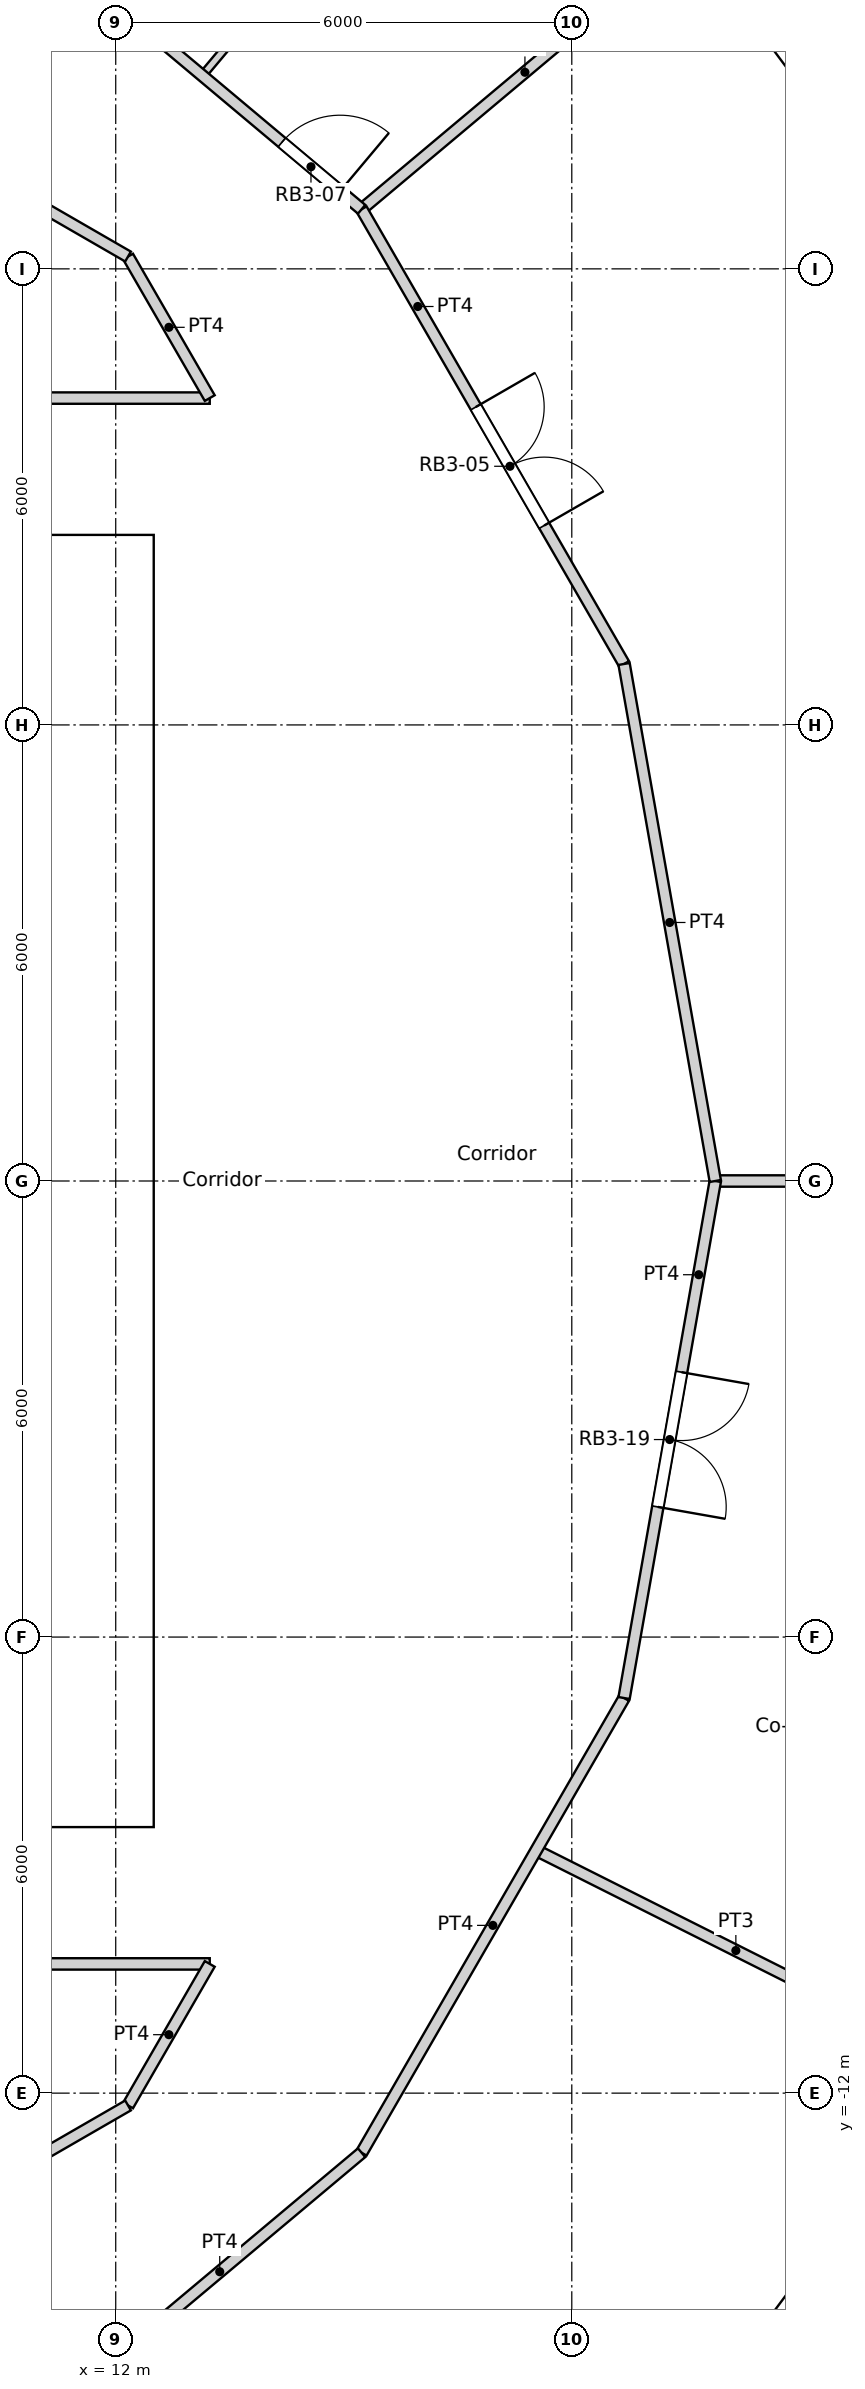
"""IFC4 building model, lengths in metres.
Left out: names, types, materials, properties, quantities, classifications, styles, units other than length and angle.
Written with IfcOpenShell. Run it as: python <this file> out.ifc"""

import sys

from ifc_helpers import new_model, si_unit, direction, frame, frame_2d, origin, origin_2d, place, context, subcontext, project, spatial, rectangle, circle, extrude, element, fill, save


model = new_model("IFC4")
c1 = context("Model", 3, precision=1e-05, world=origin(), true_north=direction((0.0, 1.0)))
c2 = subcontext(c1, "Body", "Model", "MODEL_VIEW")
j1 = project(units=[si_unit("LENGTHUNIT", "METRE"), si_unit("PLANEANGLEUNIT", "RADIAN")], contexts=[c1])
p1 = place(None, origin())
s1 = spatial("IfcSite", under=j1, at=p1, CompositionType="ELEMENT")
p2 = place(p1, origin())
s2 = spatial("IfcBuilding", under=s1, at=p2, CompositionType="ELEMENT")
p3 = place(p2, frame((0.0, 0.0, 147.6)))
s3 = spatial("IfcBuildingStorey", under=s2, at=p3, CompositionType="ELEMENT", Elevation=147.6)
for number, where, z_axis, x_axis in (
    (1, (18.822, 0.0, 0.0), (0.0, 0.0, 1.0), (1.0, 0.0, 0.0)),
    (2, (17.986, 5.548, 0.0), (0.0, 0.0, 1.0), (1.0, 0.0, 0.0)),
    (3, (15.552, 10.603, 0.0), (0.0, 0.0, 1.0), (1.0, 0.0, 0.0)),
    (4, (11.735, 14.716, 0.0), (0.0, 0.0, 1.0), (1.0, 0.0, 0.0)),
    (5, (11.735, -14.716, 0.0), (0.0, 0.0, 1.0), (1.0, 0.0, 0.0)),
    (6, (15.552, -10.603, 0.0), (0.0, 0.0, 1.0), (1.0, 0.0, 0.0)),
    (7, (17.986, -5.548, 0.0), (0.0, 0.0, 1.0), (1.0, 0.0, 0.0)),
):
    element("IfcColumn", number, at=place(p3, frame(where, z_axis=z_axis, x_axis=x_axis)), inside=s3, PredefinedType="COLUMN", context=c2, shape_type="SweptSolid", body=[
        extrude(circle(Radius=0.65, at=origin_2d()), origin(), (0.0, 0.0, 1.0), 3.6),
    ])
p4 = place(p3, frame((21.428, 14.094, 0.0), z_axis=(0.0, 0.0, 1.0), x_axis=(-0.597197580538, 0.80209416517, 0.0)))
e8 = element("IfcWall", 8, at=p4, inside=s3, PredefinedType="SOLIDWALL", context=c2, shape_type="SweptSolid", body=[
    extrude(rectangle(XDim=2.973, YDim=0.3, at=frame_2d((1.486, 0.0))), origin(), (0.0, 0.0, 1.0), 3.3),
])
p5 = place(p4, frame((1.486, 0.0, 1.55)))
e9 = element("IfcOpeningElement", 9, at=p5, cuts=e8, PredefinedType="OPENING", context=c2, shape_type="SweptSolid", body=[
    extrude(circle(Radius=0.9, at=origin_2d()), frame((0.0, 0.16, 0.0), z_axis=(0.0, -1.0, 0.0), x_axis=(1.0, 0.0, 0.0)), (0.0, 0.0, 1.0), 0.32),
])
p6 = place(p3, frame((20.103, -16.836, -0.3), z_axis=(0.0, 0.0, 1.0), x_axis=(0.597183717734, 0.802104486506, 0.0)))
e10 = element("IfcWall", 10, at=p6, inside=s3, PredefinedType="ELEMENTEDWALL", context=c2, shape_type="SweptSolid", body=[
    extrude(rectangle(XDim=3.0, YDim=1.45, at=frame_2d((1.5, 0.0))), origin(), (0.0, 0.0, 1.0), 3.6),
])
p7 = place(p6, frame((1.5, 0.0, 1.85)))
e11 = element("IfcOpeningElement", 11, at=p7, cuts=e10, PredefinedType="OPENING", context=c2, shape_type="SweptSolid", body=[
    extrude(circle(Radius=0.9, at=origin_2d()), frame((0.0, 0.735, 0.0), z_axis=(0.0, -1.0, 0.0), x_axis=(1.0, 0.0, 0.0)), (0.0, 0.0, 1.0), 1.47),
])
p8 = place(p3, frame((-12.5, -8.05, 0.0), z_axis=(0.0, 0.0, 1.0), x_axis=(1.0, 0.0, 0.0)))
e12 = element("IfcWall", 12, at=p8, inside=s3, PredefinedType="SOLIDWALL", context=c2, shape_type="SweptSolid", body=[
    extrude(rectangle(XDim=25.0, YDim=0.9, at=frame_2d((12.5, 0.0))), origin(), (0.0, 0.0, 1.0), 3.6),
])
p9 = place(p8, frame((13.4, 0.0, 0.0)))
e13 = element("IfcOpeningElement", 13, at=p9, cuts=e12, PredefinedType="OPENING", context=c2, shape_type="SweptSolid", body=[
    extrude(rectangle(XDim=1.0, YDim=2.1, at=frame_2d((0.5, 1.05))), frame((0.0, 0.45, 0.0), z_axis=(0.0, -1.0, 0.0), x_axis=(1.0, 0.0, 0.0)), (0.0, 0.0, 1.0), 0.9),
])
p10 = place(p8, frame((8.3, 0.0, 0.0)))
e14 = element("IfcOpeningElement", 14, at=p10, cuts=e12, PredefinedType="OPENING", context=c2, shape_type="SweptSolid", body=[
    extrude(rectangle(XDim=1.8, YDim=2.1, at=frame_2d((0.9, 1.05))), frame((0.0, 0.45, 0.0), z_axis=(0.0, -1.0, 0.0), x_axis=(1.0, 0.0, 0.0)), (0.0, 0.0, 1.0), 0.9),
])
p11 = place(p8, frame((14.9, 0.0, 0.0)))
e15 = element("IfcOpeningElement", 15, at=p11, cuts=e12, PredefinedType="OPENING", context=c2, shape_type="SweptSolid", body=[
    extrude(rectangle(XDim=1.8, YDim=2.1, at=frame_2d((0.9, 1.05))), frame((0.0, 0.45, 0.0), z_axis=(0.0, -1.0, 0.0), x_axis=(1.0, 0.0, 0.0)), (0.0, 0.0, 1.0), 0.9),
])
p12 = place(p3, frame((-12.5, 8.05, 0.0), z_axis=(0.0, 0.0, 1.0), x_axis=(1.0, 0.0, 0.0)))
e16 = element("IfcWall", 16, at=p12, inside=s3, PredefinedType="SOLIDWALL", context=c2, shape_type="SweptSolid", body=[
    extrude(rectangle(XDim=25.0, YDim=0.9, at=frame_2d((12.5, 0.0))), origin(), (0.0, 0.0, 1.0), 3.6),
])
p13 = place(p12, frame((8.3, 0.0, 0.0)))
e17 = element("IfcOpeningElement", 17, at=p13, cuts=e16, PredefinedType="OPENING", context=c2, shape_type="SweptSolid", body=[
    extrude(rectangle(XDim=1.8, YDim=2.1, at=frame_2d((0.9, 1.05))), frame((0.0, 0.45, 0.0), z_axis=(0.0, -1.0, 0.0), x_axis=(1.0, 0.0, 0.0)), (0.0, 0.0, 1.0), 0.9),
])
p14 = place(p3, frame((12.05, -7.6, 0.0), z_axis=(0.0, 0.0, 1.0), x_axis=(0.0, 1.0, 0.0)))
e18 = element("IfcWall", 18, at=p14, inside=s3, PredefinedType="SOLIDWALL", context=c2, shape_type="SweptSolid", body=[
    extrude(rectangle(XDim=15.2, YDim=0.9, at=frame_2d((7.6, 0.0))), origin(), (0.0, 0.0, 1.0), 3.6),
])
p15 = place(p14, frame((5.1, 0.0, 0.0)))
e19 = element("IfcOpeningElement", 19, at=p15, cuts=e18, PredefinedType="OPENING", context=c2, shape_type="SweptSolid", body=[
    extrude(rectangle(XDim=1.0, YDim=2.1, at=frame_2d((0.5, 1.05))), frame((0.0, 0.45, 0.0), z_axis=(0.0, -1.0, 0.0), x_axis=(1.0, 0.0, 0.0)), (0.0, 0.0, 1.0), 0.9),
])
p16 = place(p3, frame((9.2, -4.55, 0.0), z_axis=(0.0, 0.0, 1.0), x_axis=(1.0, 0.0, 0.0)))
e20 = element("IfcWall", 20, at=p16, inside=s3, PredefinedType="SOLIDWALL", context=c2, shape_type="SweptSolid", body=[
    extrude(rectangle(XDim=2.4, YDim=0.3, at=frame_2d((1.2, 0.0))), origin(), (0.0, 0.0, 1.0), 3.3),
])
p17 = place(p16, frame((0.65, 0.0, 0.0)))
e21 = element("IfcOpeningElement", 21, at=p17, cuts=e20, PredefinedType="OPENING", context=c2, shape_type="SweptSolid", body=[
    extrude(rectangle(XDim=1.1, YDim=2.1, at=frame_2d((0.55, 1.05))), frame((0.0, 0.15, 0.0), z_axis=(0.0, -1.0, 0.0), x_axis=(1.0, 0.0, 0.0)), (0.0, 0.0, 1.0), 0.3),
])
p18 = place(p3, frame((9.2, 4.55, 0.0), z_axis=(0.0, 0.0, 1.0), x_axis=(1.0, 0.0, 0.0)))
e22 = element("IfcWall", 22, at=p18, inside=s3, PredefinedType="SOLIDWALL", context=c2, shape_type="SweptSolid", body=[
    extrude(rectangle(XDim=2.4, YDim=0.3, at=frame_2d((1.2, 0.0))), origin(), (0.0, 0.0, 1.0), 3.3),
])
p19 = place(p18, frame((0.65, 0.0, 0.0)))
e23 = element("IfcOpeningElement", 23, at=p19, cuts=e22, PredefinedType="OPENING", context=c2, shape_type="SweptSolid", body=[
    extrude(rectangle(XDim=1.1, YDim=2.1, at=frame_2d((0.55, 1.05))), frame((0.0, 0.15, 0.0), z_axis=(0.0, -1.0, 0.0), x_axis=(1.0, 0.0, 0.0)), (0.0, 0.0, 1.0), 0.3),
])
p20 = place(p3, frame((-3.025, 10.3, 0.0), z_axis=(0.0, 0.0, 1.0), x_axis=(1.0, 0.0, 0.0)))
e24 = element("IfcWall", 24, at=p20, inside=s3, PredefinedType="PARTITIONING", context=c2, shape_type="SweptSolid", body=[
    extrude(rectangle(XDim=16.262, YDim=0.15, at=frame_2d((8.131, 0.0))), origin(), (0.0, 0.0, 1.0), 3.3),
])
p21 = place(p20, frame((7.288, 0.0, 0.0)))
e25 = element("IfcOpeningElement", 25, at=p21, cuts=e24, PredefinedType="OPENING", context=c2, shape_type="SweptSolid", body=[
    extrude(rectangle(XDim=0.95, YDim=2.1, at=frame_2d((0.475, 1.05))), frame((0.0, 0.075, 0.0), z_axis=(0.0, -1.0, 0.0), x_axis=(1.0, 0.0, 0.0)), (0.0, 0.0, 1.0), 0.15),
])
p22 = place(p3, frame((-3.025, -10.3, 0.0), z_axis=(0.0, 0.0, 1.0), x_axis=(1.0, 0.0, 0.0)))
e26 = element("IfcWall", 26, at=p22, inside=s3, PredefinedType="PARTITIONING", context=c2, shape_type="SweptSolid", body=[
    extrude(rectangle(XDim=16.262, YDim=0.15, at=frame_2d((8.131, 0.0))), origin(), (0.0, 0.0, 1.0), 3.3),
])
p23 = place(p22, frame((7.287, 0.0, 0.0)))
e27 = element("IfcOpeningElement", 27, at=p23, cuts=e26, PredefinedType="OPENING", context=c2, shape_type="SweptSolid", body=[
    extrude(rectangle(XDim=0.95, YDim=2.1, at=frame_2d((0.475, 1.05))), frame((0.0, 0.075, 0.0), z_axis=(0.0, -1.0, 0.0), x_axis=(1.0, 0.0, 0.0)), (0.0, 0.0, 1.0), 0.15),
])
for number, where, z_axis, x_axis in (
    (28, (12.162, 12.162, 0.0), (0.0, 0.0, 1.0), (0.5, -0.866, 0.0)),
    (29, (12.162, -12.162, 0.0), (0.0, 0.0, 1.0), (0.5, 0.866, 0.0)),
):
    element("IfcWall", number, at=place(p3, frame(where, z_axis=z_axis, x_axis=x_axis)), inside=s3, PredefinedType="PARTITIONING", context=c2, shape_type="SweptSolid", body=[
        extrude(rectangle(XDim=2.15, YDim=0.15, at=frame_2d((1.075, 0.0))), origin(), (0.0, 0.0, 1.0), 3.3),
    ])
p24 = place(p3, frame((15.235, 12.784, 0.0), z_axis=(0.0, 0.0, 1.0), x_axis=(0.499914202267, -0.866074933462, 0.0)))
e30 = element("IfcWall", 30, at=p24, inside=s3, PredefinedType="PARTITIONING", context=c2, shape_type="SweptSolid", body=[
    extrude(rectangle(XDim=6.907, YDim=0.15, at=frame_2d((3.454, 0.0))), origin(), (0.0, 0.0, 1.0), 3.3),
])
p25 = place(p24, frame((3.004, 0.0, 0.0)))
e31 = element("IfcOpeningElement", 31, at=p25, cuts=e30, PredefinedType="OPENING", context=c2, shape_type="SweptSolid", body=[
    extrude(rectangle(XDim=1.8, YDim=2.1, at=frame_2d((0.9, 1.05))), frame((0.0, 0.075, 0.0), z_axis=(0.0, -1.0, 0.0), x_axis=(1.0, 0.0, 0.0)), (0.0, 0.0, 1.0), 0.15),
])
p26 = place(p3, frame((18.688, 6.802, 0.0), z_axis=(0.0, 0.0, 1.0), x_axis=(0.173728873845, -0.98479352069, 0.0)))
e32 = element("IfcWall", 32, at=p26, inside=s3, PredefinedType="PARTITIONING", context=c2, shape_type="SweptSolid", body=[
    extrude(rectangle(XDim=6.907, YDim=0.15, at=frame_2d((3.454, 0.0))), origin(), (0.0, 0.0, 1.0), 3.3),
])
p27 = place(p3, frame((9.943, 17.222, 0.0), z_axis=(0.0, 0.0, 1.0), x_axis=(0.766192104565, -0.642611592567, 0.0)))
e33 = element("IfcWall", 33, at=p27, inside=s3, PredefinedType="PARTITIONING", context=c2, shape_type="SweptSolid", body=[
    extrude(rectangle(XDim=6.906, YDim=0.15, at=frame_2d((3.453, 0.0))), origin(), (0.0, 0.0, 1.0), 3.3),
])
p28 = place(p27, frame((5.537, 0.0, 0.0)))
e34 = element("IfcOpeningElement", 34, at=p28, cuts=e33, PredefinedType="OPENING", context=c2, shape_type="SweptSolid", body=[
    extrude(rectangle(XDim=1.0, YDim=2.1, at=frame_2d((0.5, 1.05))), frame((0.0, 0.075, 0.0), z_axis=(0.0, -1.0, 0.0), x_axis=(1.0, 0.0, 0.0)), (0.0, 0.0, 1.0), 0.15),
])
p29 = place(p3, frame((15.235, -12.784, 0.0), z_axis=(0.0, 0.0, 1.0), x_axis=(0.499914202267, 0.866074933462, 0.0)))
e35 = element("IfcWall", 35, at=p29, inside=s3, PredefinedType="PARTITIONING", context=c2, shape_type="SweptSolid", body=[
    extrude(rectangle(XDim=6.907, YDim=0.15, at=frame_2d((3.454, 0.0))), origin(), (0.0, 0.0, 1.0), 3.3),
])
p30 = place(p3, frame((9.943, -17.222, 0.0), z_axis=(0.0, 0.0, 1.0), x_axis=(0.766192104565, 0.642611592567, 0.0)))
e36 = element("IfcWall", 36, at=p30, inside=s3, PredefinedType="PARTITIONING", context=c2, shape_type="SweptSolid", body=[
    extrude(rectangle(XDim=6.906, YDim=0.15, at=frame_2d((3.453, 0.0))), origin(), (0.0, 0.0, 1.0), 3.3),
])
p31 = place(p30, frame((0.984, 0.0, 0.0)))
e37 = element("IfcOpeningElement", 37, at=p31, cuts=e36, PredefinedType="OPENING", context=c2, shape_type="SweptSolid", body=[
    extrude(rectangle(XDim=1.0, YDim=2.04, at=frame_2d((0.5, 1.02))), frame((0.0, 0.075, 0.0), z_axis=(0.0, -1.0, 0.0), x_axis=(1.0, 0.0, 0.0)), (0.0, 0.0, 1.0), 0.15),
])
p32 = place(p3, frame((18.688, -6.802, 0.0), z_axis=(0.0, 0.0, 1.0), x_axis=(0.173728873845, 0.98479352069, 0.0)))
e38 = element("IfcWall", 38, at=p32, inside=s3, PredefinedType="PARTITIONING", context=c2, shape_type="SweptSolid", body=[
    extrude(rectangle(XDim=6.907, YDim=0.15, at=frame_2d((3.454, 0.0))), origin(), (0.0, 0.0, 1.0), 3.3),
])
p33 = place(p32, frame((2.553, 0.0, 0.0)))
e39 = element("IfcOpeningElement", 39, at=p33, cuts=e38, PredefinedType="OPENING", context=c2, shape_type="SweptSolid", body=[
    extrude(rectangle(XDim=1.8, YDim=2.1, at=frame_2d((0.9, 1.05))), frame((0.0, 0.075, 0.0), z_axis=(0.0, -1.0, 0.0), x_axis=(1.0, 0.0, 0.0)), (0.0, 0.0, 1.0), 0.15),
])
for number, where, z_axis, x_axis in (
    (40, (4.452, 16.614, 0.0), (0.0, 0.0, 1.0), (0.866, -0.5, 0.0)),
    (41, (4.452, -16.614, 0.0), (0.0, 0.0, 1.0), (0.866, 0.5, 0.0)),
):
    element("IfcWall", number, at=place(p3, frame(where, z_axis=z_axis, x_axis=x_axis)), inside=s3, PredefinedType="PARTITIONING", context=c2, shape_type="SweptSolid", body=[
        extrude(rectangle(XDim=8.903, YDim=0.15, at=frame_2d((4.452, 0.0))), origin(), (0.0, 0.0, 1.0), 3.3),
    ])
p34 = place(p3, frame((15.235, 12.784, 0.0), z_axis=(0.0, 0.0, 1.0), x_axis=(0.76609059793, 0.642732600514, 0.0)))
e42 = element("IfcWall", 42, at=p34, inside=s3, PredefinedType="PARTITIONING", context=c2, shape_type="SweptSolid", body=[
    extrude(rectangle(XDim=5.609, YDim=0.15, at=frame_2d((2.804, 0.0))), origin(), (0.0, 0.0, 1.0), 3.3),
])
p35 = place(p3, frame((19.888, 0.0, 0.0), z_axis=(0.0, 0.0, 1.0), x_axis=(1.0, 0.0, 0.0)))
e43 = element("IfcWall", 43, at=p35, inside=s3, PredefinedType="PARTITIONING", context=c2, shape_type="SweptSolid", body=[
    extrude(rectangle(XDim=5.609, YDim=0.15, at=frame_2d((2.805, 0.0))), origin(), (0.0, 0.0, 1.0), 3.3),
])
p36 = place(p3, frame((13.139, 14.542, 0.0), z_axis=(0.0, 0.0, 1.0), x_axis=(0.642731657745, 0.766091388891, 0.0)))
e44 = element("IfcWall", 44, at=p36, inside=s3, PredefinedType="PARTITIONING", context=c2, shape_type="SweptSolid", body=[
    extrude(rectangle(XDim=2.401, YDim=0.1, at=frame_2d((1.2, 0.0))), origin(), (0.0, 0.0, 1.0), 3.3),
])
p37 = place(p36, frame((0.75, 0.0, 0.0)))
e45 = element("IfcOpeningElement", 45, at=p37, cuts=e44, PredefinedType="OPENING", context=c2, shape_type="SweptSolid", body=[
    extrude(rectangle(XDim=0.9, YDim=2.04, at=frame_2d((0.45, 1.02))), frame((0.0, 0.05, 0.0), z_axis=(0.0, -1.0, 0.0), x_axis=(1.0, 0.0, 0.0)), (0.0, 0.0, 1.0), 0.1),
])
p38 = place(p3, frame((17.532, -8.805, 0.0), z_axis=(0.0, 0.0, 1.0), x_axis=(0.893628331628, -0.448807759415, 0.0)))
e46 = element("IfcWall", 46, at=p38, inside=s3, PredefinedType="PARTITIONING", context=c2, shape_type="SweptSolid", body=[
    extrude(rectangle(XDim=5.878, YDim=0.15, at=frame_2d((2.939, 0.0))), origin(), (0.0, 0.0, 1.0), 3.3),
])
p39 = place(p5, origin())
e47 = element("IfcWindow", 47, at=p39, inside=s3, PartitioningType="SINGLE_PANEL", PredefinedType="WINDOW", context=c2, shape_type="SweptSolid", body=[
    extrude(circle(Radius=0.9, at=origin_2d()), frame((0.0, 0.12, 0.0), z_axis=(0.0, -1.0, 0.0), x_axis=(1.0, 0.0, 0.0)), (0.0, 0.0, 1.0), 0.1),
])
fill(e9, e47)
p40 = place(p7, origin())
e48 = element("IfcWindow", 48, at=p40, inside=s3, PartitioningType="SINGLE_PANEL", PredefinedType="WINDOW", context=c2, shape_type="SweptSolid", body=[
    extrude(circle(Radius=0.9, at=origin_2d()), frame((0.0, 0.695, 0.0), z_axis=(0.0, -1.0, 0.0), x_axis=(1.0, 0.0, 0.0)), (0.0, 0.0, 1.0), 0.1),
])
fill(e11, e48)
p41 = place(p15, origin())
e49 = element("IfcDoor", 49, at=p41, inside=s3, OperationType="DOUBLE_DOOR_SINGLE_SWING", PredefinedType="DOOR", context=c2, shape_type="SweptSolid", body=[
    extrude(rectangle(XDim=1.0, YDim=2.1, at=frame_2d((0.5, 1.05))), frame((0.0, 0.025, 0.0), z_axis=(0.0, -1.0, 0.0), x_axis=(1.0, 0.0, 0.0)), (0.0, 0.0, 1.0), 0.05),
])
fill(e19, e49)
p42 = place(p25, origin())
e50 = element("IfcDoor", 50, at=p42, inside=s3, OperationType="DOUBLE_DOOR_SINGLE_SWING", PredefinedType="DOOR", context=c2, shape_type="SweptSolid", body=[
    extrude(rectangle(XDim=1.8, YDim=2.1, at=frame_2d((0.9, 1.05))), frame((0.0, 0.025, 0.0), z_axis=(0.0, -1.0, 0.0), x_axis=(1.0, 0.0, 0.0)), (0.0, 0.0, 1.0), 0.05),
])
fill(e31, e50)
p43 = place(p28, origin())
e51 = element("IfcDoor", 51, at=p43, inside=s3, OperationType="SINGLE_SWING_RIGHT", PredefinedType="DOOR", context=c2, shape_type="SweptSolid", body=[
    extrude(rectangle(XDim=1.0, YDim=2.1, at=frame_2d((0.5, 1.05))), frame((0.0, 0.025, 0.0), z_axis=(0.0, -1.0, 0.0), x_axis=(1.0, 0.0, 0.0)), (0.0, 0.0, 1.0), 0.05),
])
fill(e34, e51)
p44 = place(p33, origin())
e52 = element("IfcDoor", 52, at=p44, inside=s3, OperationType="DOUBLE_DOOR_SINGLE_SWING", PredefinedType="DOOR", context=c2, shape_type="SweptSolid", body=[
    extrude(rectangle(XDim=1.8, YDim=2.1, at=frame_2d((0.9, 1.05))), frame((0.0, 0.025, 0.0), z_axis=(0.0, -1.0, 0.0), x_axis=(1.0, 0.0, 0.0)), (0.0, 0.0, 1.0), 0.05),
])
fill(e39, e52)
save(model, sys.argv[1])
